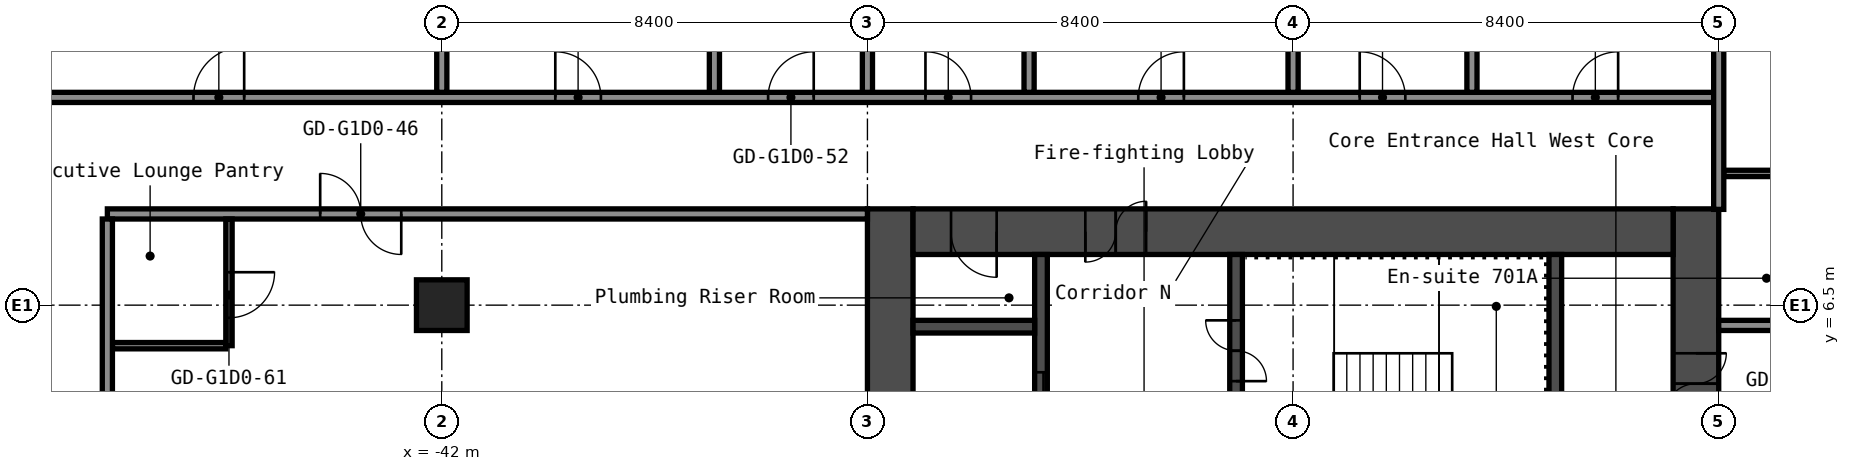
"""IFC4 building model, lengths in metres.
Left out: names, types, materials, properties, quantities, classifications, styles, units other than length and angle.
Written with IfcOpenShell. Run it as: python <this file> out.ifc"""

import sys

from ifc_helpers import new_model, si_unit, direction, frame, frame_2d, origin, origin_2d, place, context, subcontext, project, spatial, rectangle, hollow_rectangle, extrude, element, fill, save


model = new_model("IFC4")
c1 = context("Model", 3, precision=1e-05, world=origin(), true_north=direction((0.0, 1.0)))
c2 = subcontext(c1, "Body", "Model", "MODEL_VIEW")
j1 = project(units=[si_unit("LENGTHUNIT", "METRE"), si_unit("PLANEANGLEUNIT", "RADIAN")], contexts=[c1])
p1 = place(None, origin())
s1 = spatial("IfcSite", under=j1, at=p1, CompositionType="ELEMENT")
p2 = place(p1, origin())
s2 = spatial("IfcBuilding", under=s1, at=p2, CompositionType="ELEMENT")
p3 = place(p2, frame((0.0, 0.0, 29.4)))
s3 = spatial("IfcBuildingStorey", under=s2, at=p3, CompositionType="ELEMENT", Elevation=29.4)
p4 = place(p3, frame((-42.0, 6.5, 0.0), z_axis=(0.0, 0.0, 1.0), x_axis=(1.0, 0.0, 0.0)))
e1 = element("IfcColumn", 1, at=p4, inside=s3, PredefinedType="COLUMN", context=c2, shape_type="SweptSolid", body=[
    extrude(hollow_rectangle(XDim=1.0, YDim=1.0, WallThickness=0.04, at=origin_2d()), origin(), (0.0, 0.0, 1.0), 2.8),
])
p5 = place(p3, frame((-17.25, -8.4, 0.0), z_axis=(0.0, 0.0, 1.0), x_axis=(0.0, 1.0, 0.0)))
e2 = element("IfcWall", 2, at=p5, inside=s3, PredefinedType="SHEAR", context=c2, shape_type="SweptSolid", body=[
    extrude(rectangle(XDim=16.8, YDim=0.9, at=frame_2d((8.4, 0.0))), origin(), (0.0, 0.0, 1.0), 2.8),
])
p6 = place(p5, frame((12.75, 0.0, 0.0)))
e3 = element("IfcOpeningElement", 3, at=p6, cuts=e2, PredefinedType="OPENING", context=c2, shape_type="SweptSolid", body=[
    extrude(rectangle(XDim=1.2, YDim=2.1, at=frame_2d((0.6, 1.05))), frame((0.0, 0.46, 0.0), z_axis=(0.0, -1.0, 0.0), x_axis=(1.0, 0.0, 0.0)), (0.0, 0.0, 1.0), 0.92),
])
p7 = place(p5, frame((2.85, 0.0, 0.0)))
e4 = element("IfcOpeningElement", 4, at=p7, cuts=e2, PredefinedType="OPENING", context=c2, shape_type="SweptSolid", body=[
    extrude(rectangle(XDim=1.2, YDim=2.1, at=frame_2d((0.6, 1.05))), frame((0.0, 0.46, 0.0), z_axis=(0.0, -1.0, 0.0), x_axis=(1.0, 0.0, 0.0)), (0.0, 0.0, 1.0), 0.92),
])
p8 = place(p3, frame((-33.15, -8.4, 0.0), z_axis=(0.0, 0.0, 1.0), x_axis=(0.0, 1.0, 0.0)))
e5 = element("IfcWall", 5, at=p8, inside=s3, PredefinedType="SHEAR", context=c2, shape_type="SweptSolid", body=[
    extrude(rectangle(XDim=16.8, YDim=0.9, at=frame_2d((8.4, 0.0))), origin(), (0.0, 0.0, 1.0), 2.8),
])
p9 = place(p3, frame((-32.7, 7.95, 0.0), z_axis=(0.0, 0.0, 1.0), x_axis=(1.0, 0.0, 0.0)))
e6 = element("IfcWall", 6, at=p9, inside=s3, PredefinedType="SHEAR", context=c2, shape_type="SweptSolid", body=[
    extrude(rectangle(XDim=15.0, YDim=0.9, at=frame_2d((7.5, 0.0))), origin(), (0.0, 0.0, 1.0), 2.8),
])
p10 = place(p9, frame((3.4, 0.0, 0.0)))
e7 = element("IfcOpeningElement", 7, at=p10, cuts=e6, PredefinedType="OPENING", context=c2, shape_type="SweptSolid", body=[
    extrude(rectangle(XDim=1.2, YDim=2.1, at=frame_2d((0.6, 1.05))), frame((0.0, 0.46, 0.0), z_axis=(0.0, -1.0, 0.0), x_axis=(1.0, 0.0, 0.0)), (0.0, 0.0, 1.0), 0.92),
])
p11 = place(p9, frame((0.75, 0.0, 0.0)))
e8 = element("IfcOpeningElement", 8, at=p11, cuts=e6, PredefinedType="OPENING", context=c2, shape_type="SweptSolid", body=[
    extrude(rectangle(XDim=0.9, YDim=2.1, at=frame_2d((0.45, 1.05))), frame((0.0, 0.46, 0.0), z_axis=(0.0, -1.0, 0.0), x_axis=(1.0, 0.0, 0.0)), (0.0, 0.0, 1.0), 0.92),
])
p12 = place(p3, frame((-20.025, 1.2, 0.0), z_axis=(0.0, 0.0, 1.0), x_axis=(0.0, 1.0, 0.0)))
e9 = element("IfcWall", 9, at=p12, inside=s3, PredefinedType="SHEAR", context=c2, shape_type="SweptSolid", body=[
    extrude(rectangle(XDim=6.3, YDim=0.25, at=frame_2d((3.15, 0.0))), origin(), (0.0, 0.0, 1.0), 2.8),
])
p13 = place(p3, frame((-26.325, 3.75, 0.0), z_axis=(0.0, 0.0, 1.0), x_axis=(0.0, 1.0, 0.0)))
e10 = element("IfcWall", 10, at=p13, inside=s3, PredefinedType="SHEAR", context=c2, shape_type="SweptSolid", body=[
    extrude(rectangle(XDim=3.75, YDim=0.25, at=frame_2d((1.875, 0.0))), origin(), (0.0, 0.0, 1.0), 2.8),
])
p14 = place(p13, frame((1.25, 0.0, 0.0)))
e11 = element("IfcOpeningElement", 11, at=p14, cuts=e10, PredefinedType="OPENING", context=c2, shape_type="SweptSolid", body=[
    extrude(rectangle(XDim=1.2, YDim=2.1, at=frame_2d((0.6, 1.05))), frame((0.0, 0.135, 0.0), z_axis=(0.0, -1.0, 0.0), x_axis=(1.0, 0.0, 0.0)), (0.0, 0.0, 1.0), 0.27),
])
p15 = place(p3, frame((-30.175, 1.45, 0.0), z_axis=(0.0, 0.0, 1.0), x_axis=(0.0, 1.0, 0.0)))
e12 = element("IfcWall", 12, at=p15, inside=s3, PredefinedType="SHEAR", context=c2, shape_type="SweptSolid", body=[
    extrude(rectangle(XDim=6.05, YDim=0.25, at=frame_2d((3.025, 0.0))), origin(), (0.0, 0.0, 1.0), 2.8),
])
p16 = place(p15, frame((2.625, 0.0, 0.0)))
e13 = element("IfcOpeningElement", 13, at=p16, cuts=e12, PredefinedType="OPENING", context=c2, shape_type="SweptSolid", body=[
    extrude(rectangle(XDim=1.1, YDim=2.1, at=frame_2d((0.55, 1.05))), frame((0.0, 0.135, 0.0), z_axis=(0.0, -1.0, 0.0), x_axis=(1.0, 0.0, 0.0)), (0.0, 0.0, 1.0), 0.27),
])
p17 = place(p3, frame((-32.7, 6.075, 0.0), z_axis=(0.0, 0.0, 1.0), x_axis=(1.0, 0.0, 0.0)))
e14 = element("IfcWall", 14, at=p17, inside=s3, PredefinedType="SHEAR", context=c2, shape_type="SweptSolid", body=[
    extrude(rectangle(XDim=2.4, YDim=0.25, at=frame_2d((1.2, 0.0))), origin(), (0.0, 0.0, 1.0), 2.8),
])
p18 = place(p3, frame((-48.5, 5.7, 0.0), z_axis=(0.0, 0.0, 1.0), x_axis=(1.0, 0.0, 0.0)))
e15 = element("IfcWall", 15, at=p18, inside=s3, PredefinedType="PARTITIONING", context=c2, shape_type="SweptSolid", body=[
    extrude(rectangle(XDim=2.238, YDim=0.125, at=frame_2d((1.119, 0.0))), origin(), (0.0, 0.0, 1.0), 2.8),
])
p19 = place(p3, frame((-16.8, 6.1, 0.0), z_axis=(0.0, 0.0, 1.0), x_axis=(1.0, 0.0, 0.0)))
e16 = element("IfcWall", 16, at=p19, inside=s3, PredefinedType="PARTITIONING", context=c2, shape_type="SweptSolid", body=[
    extrude(rectangle(XDim=33.6, YDim=0.2, at=frame_2d((16.8, 0.0))), origin(), (0.0, 0.0, 1.0), 2.8),
])
p20 = place(p19, frame((2.85, 0.0, 0.0)))
e17 = element("IfcOpeningElement", 17, at=p20, cuts=e16, PredefinedType="OPENING", context=c2, shape_type="SweptSolid", body=[
    extrude(rectangle(XDim=1.0, YDim=2.1, at=frame_2d((0.5, 1.05))), frame((0.0, 0.11, 0.0), z_axis=(0.0, -1.0, 0.0), x_axis=(1.0, 0.0, 0.0)), (0.0, 0.0, 1.0), 0.22),
])
p21 = place(p19, frame((4.55, 0.0, 0.0)))
e18 = element("IfcOpeningElement", 18, at=p21, cuts=e16, PredefinedType="OPENING", context=c2, shape_type="SweptSolid", body=[
    extrude(rectangle(XDim=1.0, YDim=2.1, at=frame_2d((0.5, 1.05))), frame((0.0, 0.11, 0.0), z_axis=(0.0, -1.0, 0.0), x_axis=(1.0, 0.0, 0.0)), (0.0, 0.0, 1.0), 0.22),
])
p22 = place(p19, frame((13.8, 0.0, 0.0)))
e19 = element("IfcOpeningElement", 19, at=p22, cuts=e16, PredefinedType="OPENING", context=c2, shape_type="SweptSolid", body=[
    extrude(rectangle(XDim=1.0, YDim=2.1, at=frame_2d((0.5, 1.05))), frame((0.0, 0.11, 0.0), z_axis=(0.0, -1.0, 0.0), x_axis=(1.0, 0.0, 0.0)), (0.0, 0.0, 1.0), 0.22),
])
p23 = place(p19, frame((19.65, 0.0, 0.0)))
e20 = element("IfcOpeningElement", 20, at=p23, cuts=e16, PredefinedType="OPENING", context=c2, shape_type="SweptSolid", body=[
    extrude(rectangle(XDim=1.0, YDim=2.1, at=frame_2d((0.5, 1.05))), frame((0.0, 0.11, 0.0), z_axis=(0.0, -1.0, 0.0), x_axis=(1.0, 0.0, 0.0)), (0.0, 0.0, 1.0), 0.22),
])
p24 = place(p19, frame((21.35, 0.0, 0.0)))
e21 = element("IfcOpeningElement", 21, at=p24, cuts=e16, PredefinedType="OPENING", context=c2, shape_type="SweptSolid", body=[
    extrude(rectangle(XDim=1.0, YDim=2.1, at=frame_2d((0.5, 1.05))), frame((0.0, 0.11, 0.0), z_axis=(0.0, -1.0, 0.0), x_axis=(1.0, 0.0, 0.0)), (0.0, 0.0, 1.0), 0.22),
])
p25 = place(p19, frame((27.2, 0.0, 0.0)))
e22 = element("IfcOpeningElement", 22, at=p25, cuts=e16, PredefinedType="OPENING", context=c2, shape_type="SweptSolid", body=[
    extrude(rectangle(XDim=1.0, YDim=2.1, at=frame_2d((0.5, 1.05))), frame((0.0, 0.11, 0.0), z_axis=(0.0, -1.0, 0.0), x_axis=(1.0, 0.0, 0.0)), (0.0, 0.0, 1.0), 0.22),
])
p26 = place(p3, frame((-48.6, 8.3, 0.0), z_axis=(0.0, 0.0, 1.0), x_axis=(1.0, 0.0, 0.0)))
e23 = element("IfcWall", 23, at=p26, inside=s3, PredefinedType="PARTITIONING", context=c2, shape_type="SweptSolid", body=[
    extrude(rectangle(XDim=15.0, YDim=0.2, at=frame_2d((7.5, 0.0))), origin(), (0.0, 0.0, 1.0), 2.8),
])
p27 = place(p26, frame((4.2, 0.0, 0.0)))
e24 = element("IfcOpeningElement", 24, at=p27, cuts=e23, PredefinedType="OPENING", context=c2, shape_type="SweptSolid", body=[
    extrude(rectangle(XDim=1.6, YDim=2.1, at=frame_2d((0.8, 1.05))), frame((0.0, 0.11, 0.0), z_axis=(0.0, -1.0, 0.0), x_axis=(1.0, 0.0, 0.0)), (0.0, 0.0, 1.0), 0.22),
])
p28 = place(p3, frame((-16.7, 9.1, 0.0), z_axis=(0.0, 0.0, 1.0), x_axis=(1.0, 0.0, 0.0)))
e25 = element("IfcWall", 25, at=p28, inside=s3, PredefinedType="PARTITIONING", context=c2, shape_type="SweptSolid", body=[
    extrude(rectangle(XDim=2.337, YDim=0.125, at=frame_2d((1.169, 0.0))), origin(), (0.0, 0.0, 1.0), 2.8),
])
p29 = place(p3, frame((-51.1, 10.6, 0.0), z_axis=(0.0, 0.0, 1.0), x_axis=(1.0, 0.0, 0.0)))
e26 = element("IfcWall", 26, at=p29, inside=s3, PredefinedType="PARTITIONING", context=c2, shape_type="SweptSolid", body=[
    extrude(rectangle(XDim=34.3, YDim=0.2, at=frame_2d((17.15, 0.0))), origin(), (0.0, 0.0, 1.0), 2.8),
])
p30 = place(p29, frame((4.2, 0.0, 0.0)))
e27 = element("IfcOpeningElement", 27, at=p30, cuts=e26, PredefinedType="OPENING", context=c2, shape_type="SweptSolid", body=[
    extrude(rectangle(XDim=1.0, YDim=2.1, at=frame_2d((0.5, 1.05))), frame((0.0, 0.11, 0.0), z_axis=(0.0, -1.0, 0.0), x_axis=(1.0, 0.0, 0.0)), (0.0, 0.0, 1.0), 0.22),
])
p31 = place(p29, frame((11.34, 0.0, 0.0)))
e28 = element("IfcOpeningElement", 28, at=p31, cuts=e26, PredefinedType="OPENING", context=c2, shape_type="SweptSolid", body=[
    extrude(rectangle(XDim=0.9, YDim=2.1, at=frame_2d((0.45, 1.05))), frame((0.0, 0.11, 0.0), z_axis=(0.0, -1.0, 0.0), x_axis=(1.0, 0.0, 0.0)), (0.0, 0.0, 1.0), 0.22),
])
p32 = place(p29, frame((15.54, 0.0, 0.0)))
e29 = element("IfcOpeningElement", 29, at=p32, cuts=e26, PredefinedType="OPENING", context=c2, shape_type="SweptSolid", body=[
    extrude(rectangle(XDim=0.9, YDim=2.1, at=frame_2d((0.45, 1.05))), frame((0.0, 0.11, 0.0), z_axis=(0.0, -1.0, 0.0), x_axis=(1.0, 0.0, 0.0)), (0.0, 0.0, 1.0), 0.22),
])
p33 = place(p29, frame((18.645, 0.0, 0.0)))
e30 = element("IfcOpeningElement", 30, at=p33, cuts=e26, PredefinedType="OPENING", context=c2, shape_type="SweptSolid", body=[
    extrude(rectangle(XDim=0.9, YDim=2.1, at=frame_2d((0.45, 1.05))), frame((0.0, 0.11, 0.0), z_axis=(0.0, -1.0, 0.0), x_axis=(1.0, 0.0, 0.0)), (0.0, 0.0, 1.0), 0.22),
])
p34 = place(p29, frame((22.845, 0.0, 0.0)))
e31 = element("IfcOpeningElement", 31, at=p34, cuts=e26, PredefinedType="OPENING", context=c2, shape_type="SweptSolid", body=[
    extrude(rectangle(XDim=0.9, YDim=2.1, at=frame_2d((0.45, 1.05))), frame((0.0, 0.11, 0.0), z_axis=(0.0, -1.0, 0.0), x_axis=(1.0, 0.0, 0.0)), (0.0, 0.0, 1.0), 0.22),
])
p35 = place(p29, frame((27.215, 0.0, 0.0)))
e32 = element("IfcOpeningElement", 32, at=p35, cuts=e26, PredefinedType="OPENING", context=c2, shape_type="SweptSolid", body=[
    extrude(rectangle(XDim=0.9, YDim=2.1, at=frame_2d((0.45, 1.05))), frame((0.0, 0.11, 0.0), z_axis=(0.0, -1.0, 0.0), x_axis=(1.0, 0.0, 0.0)), (0.0, 0.0, 1.0), 0.22),
])
p36 = place(p29, frame((31.415, 0.0, 0.0)))
e33 = element("IfcOpeningElement", 33, at=p36, cuts=e26, PredefinedType="OPENING", context=c2, shape_type="SweptSolid", body=[
    extrude(rectangle(XDim=0.9, YDim=2.1, at=frame_2d((0.45, 1.05))), frame((0.0, 0.11, 0.0), z_axis=(0.0, -1.0, 0.0), x_axis=(1.0, 0.0, 0.0)), (0.0, 0.0, 1.0), 0.22),
])
p37 = place(p3, frame((-48.6, -8.2, 0.0), z_axis=(0.0, 0.0, 1.0), x_axis=(0.0, 1.0, 0.0)))
e34 = element("IfcWall", 34, at=p37, inside=s3, PredefinedType="PARTITIONING", context=c2, shape_type="SweptSolid", body=[
    extrude(rectangle(XDim=16.4, YDim=0.2, at=frame_2d((8.2, 0.0))), origin(), (0.0, 0.0, 1.0), 2.8),
])
p38 = place(p3, frame((-46.2, 5.7, 0.0), z_axis=(0.0, 0.0, 1.0), x_axis=(0.0, 1.0, 0.0)))
e35 = element("IfcWall", 35, at=p38, inside=s3, PredefinedType="PARTITIONING", context=c2, shape_type="SweptSolid", body=[
    extrude(rectangle(XDim=2.5, YDim=0.125, at=frame_2d((1.25, 0.0))), origin(), (0.0, 0.0, 1.0), 2.8),
])
p39 = place(p38, frame((0.55, 0.0, 0.0)))
e36 = element("IfcOpeningElement", 36, at=p39, cuts=e35, PredefinedType="OPENING", context=c2, shape_type="SweptSolid", body=[
    extrude(rectangle(XDim=0.9, YDim=2.1, at=frame_2d((0.45, 1.05))), frame((0.0, 0.073, 0.0), z_axis=(0.0, -1.0, 0.0), x_axis=(1.0, 0.0, 0.0)), (0.0, 0.0, 1.0), 0.145),
])
for number, where, z_axis, x_axis in (
    (37, (-42.0, 10.7, 0.0), (0.0, 0.0, 1.0), (0.0, 1.0, 0.0)),
    (38, (-36.62, 10.7, 0.0), (0.0, 0.0, 1.0), (0.0, 1.0, 0.0)),
    (39, (-33.6, 10.7, 0.0), (0.0, 0.0, 1.0), (0.0, 1.0, 0.0)),
    (40, (-30.41, 10.7, 0.0), (0.0, 0.0, 1.0), (0.0, 1.0, 0.0)),
    (41, (-25.2, 10.7, 0.0), (0.0, 0.0, 1.0), (0.0, 1.0, 0.0)),
    (42, (-21.67, 10.7, 0.0), (0.0, 0.0, 1.0), (0.0, 1.0, 0.0)),
):
    element("IfcWall", number, at=place(p3, frame(where, z_axis=z_axis, x_axis=x_axis)), inside=s3, PredefinedType="PARTITIONING", context=c2, shape_type="SweptSolid", body=[
        extrude(rectangle(XDim=9.6, YDim=0.2, at=frame_2d((4.8, 0.0))), origin(), (0.0, 0.0, 1.0), 2.8),
    ])
p40 = place(p3, frame((-16.8, 8.39, 0.0), z_axis=(0.0, 0.0, 1.0), x_axis=(0.0, 1.0, 0.0)))
e43 = element("IfcWall", 43, at=p40, inside=s3, PredefinedType="PARTITIONING", context=c2, shape_type="SweptSolid", body=[
    extrude(rectangle(XDim=11.91, YDim=0.2, at=frame_2d((5.955, 0.0))), origin(), (0.0, 0.0, 1.0), 2.8),
])
p41 = place(p6, origin())
e44 = element("IfcDoor", 44, at=p41, inside=s3, OperationType="DOUBLE_DOOR_SINGLE_SWING", PredefinedType="DOOR", context=c2, shape_type="SweptSolid", body=[
    extrude(rectangle(XDim=1.2, YDim=2.1, at=frame_2d((0.6, 1.05))), frame((0.0, 0.025, 0.0), z_axis=(0.0, -1.0, 0.0), x_axis=(1.0, 0.0, 0.0)), (0.0, 0.0, 1.0), 0.05),
])
fill(e3, e44)
p42 = place(p10, origin())
e45 = element("IfcDoor", 45, at=p42, inside=s3, OperationType="DOUBLE_DOOR_SINGLE_SWING", PredefinedType="DOOR", context=c2, shape_type="SweptSolid", body=[
    extrude(rectangle(XDim=1.2, YDim=2.1, at=frame_2d((0.6, 1.05))), frame((0.0, 0.025, 0.0), z_axis=(0.0, -1.0, 0.0), x_axis=(1.0, 0.0, 0.0)), (0.0, 0.0, 1.0), 0.05),
])
fill(e7, e45)
p43 = place(p11, origin())
e46 = element("IfcDoor", 46, at=p43, inside=s3, OperationType="SINGLE_SWING_RIGHT", PredefinedType="DOOR", context=c2, shape_type="SweptSolid", body=[
    extrude(rectangle(XDim=0.9, YDim=2.1, at=frame_2d((0.45, 1.05))), frame((0.0, 0.025, 0.0), z_axis=(0.0, -1.0, 0.0), x_axis=(1.0, 0.0, 0.0)), (0.0, 0.0, 1.0), 0.05),
])
fill(e8, e46)
p44 = place(p14, origin())
e47 = element("IfcDoor", 47, at=p44, inside=s3, OperationType="DOUBLE_DOOR_SINGLE_SWING", PredefinedType="DOOR", context=c2, shape_type="SweptSolid", body=[
    extrude(rectangle(XDim=1.2, YDim=2.1, at=frame_2d((0.6, 1.05))), frame((0.0, 0.025, 0.0), z_axis=(0.0, -1.0, 0.0), x_axis=(1.0, 0.0, 0.0)), (0.0, 0.0, 1.0), 0.05),
])
fill(e11, e47)
p45 = place(p16, origin())
e48 = element("IfcDoor", 48, at=p45, inside=s3, OperationType="DOUBLE_DOOR_SLIDING", PredefinedType="DOOR", context=c2, shape_type="SweptSolid", body=[
    extrude(rectangle(XDim=1.1, YDim=2.1, at=frame_2d((0.55, 1.05))), frame((0.0, 0.025, 0.0), z_axis=(0.0, -1.0, 0.0), x_axis=(1.0, 0.0, 0.0)), (0.0, 0.0, 1.0), 0.05),
])
fill(e13, e48)
p46 = place(p27, origin())
e49 = element("IfcDoor", 49, at=p46, inside=s3, OperationType="DOUBLE_DOOR_SINGLE_SWING", PredefinedType="DOOR", context=c2, shape_type="SweptSolid", body=[
    extrude(rectangle(XDim=1.6, YDim=2.1, at=frame_2d((0.8, 1.05))), frame((0.0, 0.025, 0.0), z_axis=(0.0, -1.0, 0.0), x_axis=(1.0, 0.0, 0.0)), (0.0, 0.0, 1.0), 0.05),
])
fill(e24, e49)
p47 = place(p30, origin())
e50 = element("IfcDoor", 50, at=p47, inside=s3, OperationType="SINGLE_SWING_LEFT", PredefinedType="DOOR", context=c2, shape_type="SweptSolid", body=[
    extrude(rectangle(XDim=1.0, YDim=2.1, at=frame_2d((0.5, 1.05))), frame((0.0, 0.025, 0.0), z_axis=(0.0, -1.0, 0.0), x_axis=(1.0, 0.0, 0.0)), (0.0, 0.0, 1.0), 0.05),
])
fill(e27, e50)
p48 = place(p31, origin())
e51 = element("IfcDoor", 51, at=p48, inside=s3, OperationType="SINGLE_SWING_RIGHT", PredefinedType="DOOR", context=c2, shape_type="SweptSolid", body=[
    extrude(rectangle(XDim=0.9, YDim=2.1, at=frame_2d((0.45, 1.05))), frame((0.0, 0.025, 0.0), z_axis=(0.0, -1.0, 0.0), x_axis=(1.0, 0.0, 0.0)), (0.0, 0.0, 1.0), 0.05),
])
fill(e28, e51)
p49 = place(p32, origin())
e52 = element("IfcDoor", 52, at=p49, inside=s3, OperationType="SINGLE_SWING_LEFT", PredefinedType="DOOR", context=c2, shape_type="SweptSolid", body=[
    extrude(rectangle(XDim=0.9, YDim=2.1, at=frame_2d((0.45, 1.05))), frame((0.0, 0.025, 0.0), z_axis=(0.0, -1.0, 0.0), x_axis=(1.0, 0.0, 0.0)), (0.0, 0.0, 1.0), 0.05),
])
fill(e29, e52)
p50 = place(p33, origin())
e53 = element("IfcDoor", 53, at=p50, inside=s3, OperationType="SINGLE_SWING_RIGHT", PredefinedType="DOOR", context=c2, shape_type="SweptSolid", body=[
    extrude(rectangle(XDim=0.9, YDim=2.1, at=frame_2d((0.45, 1.05))), frame((0.0, 0.025, 0.0), z_axis=(0.0, -1.0, 0.0), x_axis=(1.0, 0.0, 0.0)), (0.0, 0.0, 1.0), 0.05),
])
fill(e30, e53)
p51 = place(p34, origin())
e54 = element("IfcDoor", 54, at=p51, inside=s3, OperationType="SINGLE_SWING_LEFT", PredefinedType="DOOR", context=c2, shape_type="SweptSolid", body=[
    extrude(rectangle(XDim=0.9, YDim=2.1, at=frame_2d((0.45, 1.05))), frame((0.0, 0.025, 0.0), z_axis=(0.0, -1.0, 0.0), x_axis=(1.0, 0.0, 0.0)), (0.0, 0.0, 1.0), 0.05),
])
fill(e31, e54)
p52 = place(p35, origin())
e55 = element("IfcDoor", 55, at=p52, inside=s3, OperationType="SINGLE_SWING_RIGHT", PredefinedType="DOOR", context=c2, shape_type="SweptSolid", body=[
    extrude(rectangle(XDim=0.9, YDim=2.1, at=frame_2d((0.45, 1.05))), frame((0.0, 0.025, 0.0), z_axis=(0.0, -1.0, 0.0), x_axis=(1.0, 0.0, 0.0)), (0.0, 0.0, 1.0), 0.05),
])
fill(e32, e55)
p53 = place(p36, origin())
e56 = element("IfcDoor", 56, at=p53, inside=s3, OperationType="SINGLE_SWING_LEFT", PredefinedType="DOOR", context=c2, shape_type="SweptSolid", body=[
    extrude(rectangle(XDim=0.9, YDim=2.1, at=frame_2d((0.45, 1.05))), frame((0.0, 0.025, 0.0), z_axis=(0.0, -1.0, 0.0), x_axis=(1.0, 0.0, 0.0)), (0.0, 0.0, 1.0), 0.05),
])
fill(e33, e56)
p54 = place(p39, origin())
e57 = element("IfcDoor", 57, at=p54, inside=s3, OperationType="SINGLE_SWING_RIGHT", PredefinedType="DOOR", context=c2, shape_type="SweptSolid", body=[
    extrude(rectangle(XDim=0.9, YDim=2.1, at=frame_2d((0.45, 1.05))), frame((0.0, 0.025, 0.0), z_axis=(0.0, -1.0, 0.0), x_axis=(1.0, 0.0, 0.0)), (0.0, 0.0, 1.0), 0.05),
])
fill(e36, e57)
save(model, sys.argv[1])
